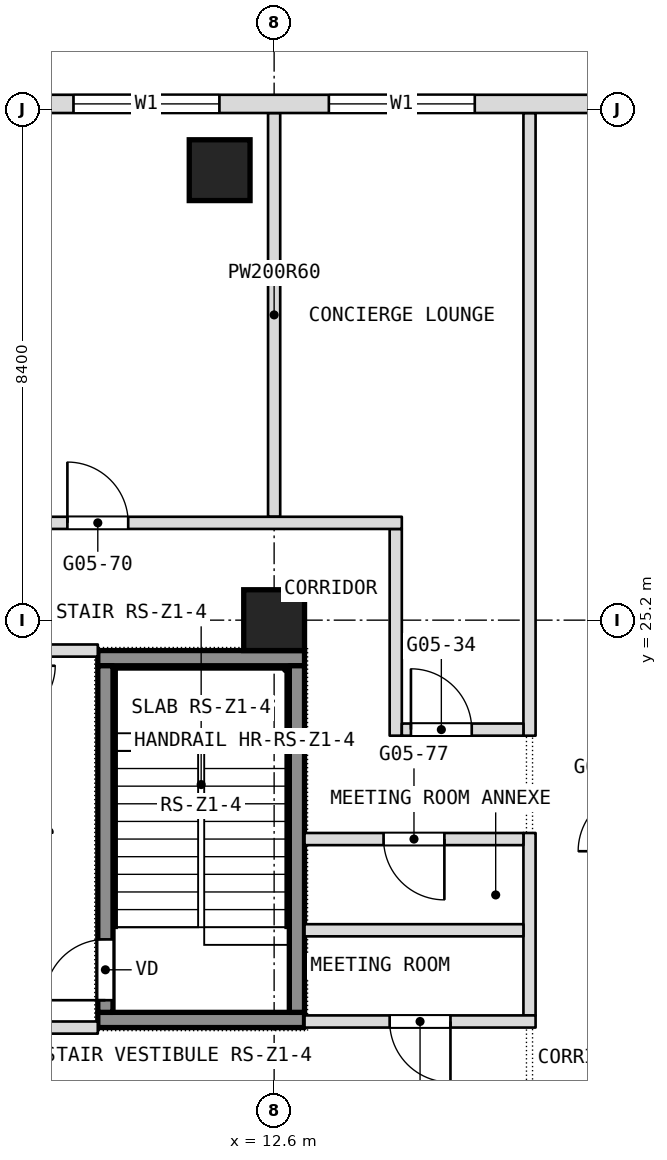
"""IFC4 building model, lengths in metres.
Left out: names, types, materials, properties, quantities, classifications, styles, units other than length and angle.
Written with IfcOpenShell. Run it as: python <this file> out.ifc"""

import sys

from ifc_helpers import new_model, si_unit, direction, frame, frame_2d, origin, origin_2d, place, context, subcontext, project, spatial, rectangle, extrude, element, fill, save


model = new_model("IFC4")
c1 = context("Model", 3, precision=1e-05, world=origin(), true_north=direction((0.0, 1.0)))
c2 = subcontext(c1, "Body", "Model", "MODEL_VIEW")
j1 = project(units=[si_unit("LENGTHUNIT", "METRE"), si_unit("PLANEANGLEUNIT", "RADIAN")], contexts=[c1])
p1 = place(None, origin())
s1 = spatial("IfcSite", under=j1, at=p1, CompositionType="ELEMENT")
p2 = place(p1, origin())
s2 = spatial("IfcBuilding", under=s1, at=p2, CompositionType="ELEMENT")
p3 = place(p2, frame((0.0, 0.0, 65.3)))
s3 = spatial("IfcBuildingStorey", under=s2, at=p3, CompositionType="ELEMENT", Elevation=65.3)
for number, where, z_axis, x_axis in (
    (1, (12.6, 25.2, 0.0), (0.0, 0.0, 1.0), (1.0, 0.0, 0.0)),
    (2, (11.704, 32.6, 0.0), (0.0, 0.0, 1.0), (1.0, 0.0, 0.0)),
):
    element("IfcColumn", number, at=place(p3, frame(where, z_axis=z_axis, x_axis=x_axis)), inside=s3, PredefinedType="COLUMN", context=c2, shape_type="SweptSolid", body=[
        extrude(rectangle(XDim=1.0, YDim=1.0, at=origin_2d()), origin(), (0.0, 0.0, 1.0), 3.6),
    ])
p4 = place(p3, frame((16.8, 18.7, 0.0), z_axis=(0.0, 0.0, 1.0), x_axis=(0.0, 1.0, 0.0)))
e3 = element("IfcWall", 3, at=p4, inside=s3, PredefinedType="PARTITIONING", context=c2, shape_type="SweptSolid", body=[
    extrude(rectangle(XDim=3.0, YDim=0.2, at=frame_2d((1.5, 0.0))), origin(), (0.0, 0.0, 1.0), 3.34),
])
p5 = place(p3, frame((16.8, 23.3, 0.0), z_axis=(0.0, 0.0, 1.0), x_axis=(0.0, 1.0, 0.0)))
e4 = element("IfcWall", 4, at=p5, inside=s3, PredefinedType="PARTITIONING", context=c2, shape_type="SweptSolid", body=[
    extrude(rectangle(XDim=10.24, YDim=0.2, at=frame_2d((5.12, 0.0))), origin(), (0.0, 0.0, 1.0), 3.34),
])
p6 = place(p3, frame((14.6, 23.3, 0.0), z_axis=(0.0, 0.0, 1.0), x_axis=(0.0, 1.0, 0.0)))
e5 = element("IfcWall", 5, at=p6, inside=s3, PredefinedType="PARTITIONING", context=c2, shape_type="SweptSolid", body=[
    extrude(rectangle(XDim=3.4, YDim=0.2, at=frame_2d((1.7, 0.0))), origin(), (0.0, 0.0, 1.0), 3.34),
])
p7 = place(p3, frame((12.6, 26.9, 0.0), z_axis=(0.0, 0.0, 1.0), x_axis=(0.0, 1.0, 0.0)))
e6 = element("IfcWall", 6, at=p7, inside=s3, PredefinedType="PARTITIONING", context=c2, shape_type="SweptSolid", body=[
    extrude(rectangle(XDim=6.64, YDim=0.2, at=frame_2d((3.32, 0.0))), origin(), (0.0, 0.0, 1.0), 3.34),
])
p8 = place(p3, frame((8.1, 18.5, 0.0), z_axis=(0.0, 0.0, 1.0), x_axis=(1.0, 0.0, 0.0)))
e7 = element("IfcWall", 7, at=p8, inside=s3, PredefinedType="PARTITIONING", context=c2, shape_type="SweptSolid", body=[
    extrude(rectangle(XDim=1.6, YDim=0.2, at=frame_2d((0.8, 0.0))), origin(), (0.0, 0.0, 1.0), 3.34),
])
p9 = place(p3, frame((13.1, 18.6, 0.0), z_axis=(0.0, 0.0, 1.0), x_axis=(1.0, 0.0, 0.0)))
e8 = element("IfcWall", 8, at=p9, inside=s3, PredefinedType="PARTITIONING", context=c2, shape_type="SweptSolid", body=[
    extrude(rectangle(XDim=3.8, YDim=0.2, at=frame_2d((1.9, 0.0))), origin(), (0.0, 0.0, 1.0), 3.34),
])
p10 = place(p9, frame((1.4, 0.0, 0.0)))
e9 = element("IfcOpeningElement", 9, at=p10, cuts=e8, PredefinedType="OPENING", context=c2, shape_type="SweptSolid", body=[
    extrude(rectangle(XDim=1.0, YDim=2.1, at=frame_2d((0.5, 1.05))), frame((0.0, 0.1, 0.0), z_axis=(0.0, -1.0, 0.0), x_axis=(1.0, 0.0, 0.0)), (0.0, 0.0, 1.0), 0.2),
])
p11 = place(p3, frame((13.1, 20.1, 0.0), z_axis=(0.0, 0.0, 1.0), x_axis=(1.0, 0.0, 0.0)))
e10 = element("IfcWall", 10, at=p11, inside=s3, PredefinedType="PARTITIONING", context=c2, shape_type="SweptSolid", body=[
    extrude(rectangle(XDim=3.6, YDim=0.2, at=frame_2d((1.8, 0.0))), origin(), (0.0, 0.0, 1.0), 3.34),
])
p12 = place(p3, frame((13.1, 21.6, 0.0), z_axis=(0.0, 0.0, 1.0), x_axis=(1.0, 0.0, 0.0)))
e11 = element("IfcWall", 11, at=p12, inside=s3, PredefinedType="PARTITIONING", context=c2, shape_type="SweptSolid", body=[
    extrude(rectangle(XDim=3.6, YDim=0.2, at=frame_2d((1.8, 0.0))), origin(), (0.0, 0.0, 1.0), 3.34),
])
p13 = place(p12, frame((1.3, 0.0, 0.0)))
e12 = element("IfcOpeningElement", 12, at=p13, cuts=e11, PredefinedType="OPENING", context=c2, shape_type="SweptSolid", body=[
    extrude(rectangle(XDim=1.0, YDim=2.1, at=frame_2d((0.5, 1.05))), frame((0.0, 0.1, 0.0), z_axis=(0.0, -1.0, 0.0), x_axis=(1.0, 0.0, 0.0)), (0.0, 0.0, 1.0), 0.2),
])
p14 = place(p3, frame((14.7, 23.4, 0.0), z_axis=(0.0, 0.0, 1.0), x_axis=(1.0, 0.0, 0.0)))
e13 = element("IfcWall", 13, at=p14, inside=s3, PredefinedType="PARTITIONING", context=c2, shape_type="SweptSolid", body=[
    extrude(rectangle(XDim=2.0, YDim=0.2, at=frame_2d((1.0, 0.0))), origin(), (0.0, 0.0, 1.0), 3.34),
])
p15 = place(p14, frame((0.15, 0.0, 0.0)))
e14 = element("IfcOpeningElement", 14, at=p15, cuts=e13, PredefinedType="OPENING", context=c2, shape_type="SweptSolid", body=[
    extrude(rectangle(XDim=1.0, YDim=2.1, at=frame_2d((0.5, 1.05))), frame((0.0, 0.1, 0.0), z_axis=(0.0, -1.0, 0.0), x_axis=(1.0, 0.0, 0.0)), (0.0, 0.0, 1.0), 0.2),
])
p16 = place(p3, frame((8.0, 24.7, 0.0), z_axis=(0.0, 0.0, 1.0), x_axis=(1.0, 0.0, 0.0)))
e15 = element("IfcWall", 15, at=p16, inside=s3, PredefinedType="PARTITIONING", context=c2, shape_type="SweptSolid", body=[
    extrude(rectangle(XDim=1.7, YDim=0.2, at=frame_2d((0.85, 0.0))), origin(), (0.0, 0.0, 1.0), 3.34),
])
p17 = place(p3, frame((6.7, 26.8, 0.0), z_axis=(0.0, 0.0, 1.0), x_axis=(1.0, 0.0, 0.0)))
e16 = element("IfcWall", 16, at=p17, inside=s3, PredefinedType="PARTITIONING", context=c2, shape_type="SweptSolid", body=[
    extrude(rectangle(XDim=8.0, YDim=0.2, at=frame_2d((4.0, 0.0))), origin(), (0.0, 0.0, 1.0), 3.34),
])
p18 = place(p17, frame((2.5, 0.0, 0.0)))
e17 = element("IfcOpeningElement", 17, at=p18, cuts=e16, PredefinedType="OPENING", context=c2, shape_type="SweptSolid", body=[
    extrude(rectangle(XDim=1.0, YDim=2.1, at=frame_2d((0.5, 1.05))), frame((0.0, 0.1, 0.0), z_axis=(0.0, -1.0, 0.0), x_axis=(1.0, 0.0, 0.0)), (0.0, 0.0, 1.0), 0.2),
])
p19 = place(p3, frame((23.406, 33.69, 0.0), z_axis=(0.0, 0.0, 1.0), x_axis=(-1.0, 0.0, 0.0)))
e18 = element("IfcWall", 18, at=p19, inside=s3, PredefinedType="NOTDEFINED", context=c2, shape_type="SweptSolid", body=[
    extrude(rectangle(XDim=46.812, YDim=0.3, at=frame_2d((23.406, 0.0))), origin(), (0.0, 0.0, 1.0), 3.6),
])
p20 = place(p19, frame((2.186, 0.0, 0.9)))
e19 = element("IfcOpeningElement", 19, at=p20, cuts=e18, PredefinedType="OPENING", context=c2, shape_type="SweptSolid", body=[
    extrude(rectangle(XDim=2.4, YDim=2.1, at=frame_2d((1.2, 1.05))), frame((0.0, 0.15, 0.0), z_axis=(0.0, -1.0, 0.0), x_axis=(1.0, 0.0, 0.0)), (0.0, 0.0, 1.0), 0.3),
])
p21 = place(p19, frame((7.506, 0.0, 0.9)))
e20 = element("IfcOpeningElement", 20, at=p21, cuts=e18, PredefinedType="OPENING", context=c2, shape_type="SweptSolid", body=[
    extrude(rectangle(XDim=2.4, YDim=2.1, at=frame_2d((1.2, 1.05))), frame((0.0, 0.15, 0.0), z_axis=(0.0, -1.0, 0.0), x_axis=(1.0, 0.0, 0.0)), (0.0, 0.0, 1.0), 0.3),
])
p22 = place(p19, frame((11.706, 0.0, 0.9)))
e21 = element("IfcOpeningElement", 21, at=p22, cuts=e18, PredefinedType="OPENING", context=c2, shape_type="SweptSolid", body=[
    extrude(rectangle(XDim=2.4, YDim=2.1, at=frame_2d((1.2, 1.05))), frame((0.0, 0.15, 0.0), z_axis=(0.0, -1.0, 0.0), x_axis=(1.0, 0.0, 0.0)), (0.0, 0.0, 1.0), 0.3),
])
p23 = place(p19, frame((15.906, 0.0, 0.9)))
e22 = element("IfcOpeningElement", 22, at=p23, cuts=e18, PredefinedType="OPENING", context=c2, shape_type="SweptSolid", body=[
    extrude(rectangle(XDim=2.4, YDim=2.1, at=frame_2d((1.2, 1.05))), frame((0.0, 0.15, 0.0), z_axis=(0.0, -1.0, 0.0), x_axis=(1.0, 0.0, 0.0)), (0.0, 0.0, 1.0), 0.3),
])
p24 = place(p19, frame((20.106, 0.0, 0.9)))
e23 = element("IfcOpeningElement", 23, at=p24, cuts=e18, PredefinedType="OPENING", context=c2, shape_type="SweptSolid", body=[
    extrude(rectangle(XDim=2.4, YDim=2.1, at=frame_2d((1.2, 1.05))), frame((0.0, 0.15, 0.0), z_axis=(0.0, -1.0, 0.0), x_axis=(1.0, 0.0, 0.0)), (0.0, 0.0, 1.0), 0.3),
])
p25 = place(p19, frame((24.306, 0.0, 0.9)))
e24 = element("IfcOpeningElement", 24, at=p25, cuts=e18, PredefinedType="OPENING", context=c2, shape_type="SweptSolid", body=[
    extrude(rectangle(XDim=2.4, YDim=2.1, at=frame_2d((1.2, 1.05))), frame((0.0, 0.15, 0.0), z_axis=(0.0, -1.0, 0.0), x_axis=(1.0, 0.0, 0.0)), (0.0, 0.0, 1.0), 0.3),
])
p26 = place(p19, frame((28.506, 0.0, 0.9)))
e25 = element("IfcOpeningElement", 25, at=p26, cuts=e18, PredefinedType="OPENING", context=c2, shape_type="SweptSolid", body=[
    extrude(rectangle(XDim=2.4, YDim=2.1, at=frame_2d((1.2, 1.05))), frame((0.0, 0.15, 0.0), z_axis=(0.0, -1.0, 0.0), x_axis=(1.0, 0.0, 0.0)), (0.0, 0.0, 1.0), 0.3),
])
p27 = place(p19, frame((32.706, 0.0, 0.9)))
e26 = element("IfcOpeningElement", 26, at=p27, cuts=e18, PredefinedType="OPENING", context=c2, shape_type="SweptSolid", body=[
    extrude(rectangle(XDim=2.4, YDim=2.1, at=frame_2d((1.2, 1.05))), frame((0.0, 0.15, 0.0), z_axis=(0.0, -1.0, 0.0), x_axis=(1.0, 0.0, 0.0)), (0.0, 0.0, 1.0), 0.3),
])
p28 = place(p19, frame((36.906, 0.0, 0.9)))
e27 = element("IfcOpeningElement", 27, at=p28, cuts=e18, PredefinedType="OPENING", context=c2, shape_type="SweptSolid", body=[
    extrude(rectangle(XDim=2.4, YDim=2.1, at=frame_2d((1.2, 1.05))), frame((0.0, 0.15, 0.0), z_axis=(0.0, -1.0, 0.0), x_axis=(1.0, 0.0, 0.0)), (0.0, 0.0, 1.0), 0.3),
])
p29 = place(p19, frame((42.226, 0.0, 0.9)))
e28 = element("IfcOpeningElement", 28, at=p29, cuts=e18, PredefinedType="OPENING", context=c2, shape_type="SweptSolid", body=[
    extrude(rectangle(XDim=2.4, YDim=2.1, at=frame_2d((1.2, 1.05))), frame((0.0, 0.15, 0.0), z_axis=(0.0, -1.0, 0.0), x_axis=(1.0, 0.0, 0.0)), (0.0, 0.0, 1.0), 0.3),
])
for number, where, z_axis, x_axis in (
    (29, (9.7, 18.625, 0.1), (0.0, 0.0, 1.0), (1.0, 0.0, 0.0)),
    (30, (9.7, 24.575, 0.1), (0.0, 0.0, 1.0), (1.0, 0.0, 0.0)),
):
    element("IfcWall", number, at=place(p3, frame(where, z_axis=z_axis, x_axis=x_axis)), inside=s3, PredefinedType="SHEAR", context=c2, shape_type="SweptSolid", body=[
        extrude(rectangle(XDim=3.4, YDim=0.25, at=frame_2d((1.7, 0.0))), origin(), (0.0, 0.0, 1.0), 3.6),
    ])
p30 = place(p3, frame((9.825, 18.75, 0.1), z_axis=(0.0, 0.0, 1.0), x_axis=(0.0, 1.0, 0.0)))
e31 = element("IfcWall", 31, at=p30, inside=s3, PredefinedType="SHEAR", context=c2, shape_type="SweptSolid", body=[
    extrude(rectangle(XDim=5.7, YDim=0.25, at=frame_2d((2.85, 0.0))), origin(), (0.0, 0.0, 1.0), 3.6),
])
p31 = place(p30, frame((0.2, 0.0, 0.0)))
e32 = element("IfcOpeningElement", 32, at=p31, cuts=e31, PredefinedType="OPENING", context=c2, shape_type="SweptSolid", body=[
    extrude(rectangle(XDim=1.0, YDim=2.1, at=frame_2d((0.5, 1.05))), frame((0.0, 0.125, 0.0), z_axis=(0.0, -1.0, 0.0), x_axis=(1.0, 0.0, 0.0)), (0.0, 0.0, 1.0), 0.25),
])
p32 = place(p3, frame((12.975, 18.75, 0.1), z_axis=(0.0, 0.0, 1.0), x_axis=(0.0, 1.0, 0.0)))
e33 = element("IfcWall", 33, at=p32, inside=s3, PredefinedType="SHEAR", context=c2, shape_type="SweptSolid", body=[
    extrude(rectangle(XDim=5.7, YDim=0.25, at=frame_2d((2.85, 0.0))), origin(), (0.0, 0.0, 1.0), 3.6),
])
p33 = place(p10, origin())
e34 = element("IfcDoor", 34, at=p33, inside=s3, OperationType="SINGLE_SWING_LEFT", PredefinedType="DOOR", context=c2, shape_type="SweptSolid", body=[
    extrude(rectangle(XDim=1.0, YDim=2.1, at=frame_2d((0.5, 1.05))), frame((0.0, 0.025, 0.0), z_axis=(0.0, -1.0, 0.0), x_axis=(1.0, 0.0, 0.0)), (0.0, 0.0, 1.0), 0.05),
])
fill(e9, e34)
p34 = place(p13, origin())
e35 = element("IfcDoor", 35, at=p34, inside=s3, OperationType="SINGLE_SWING_RIGHT", PredefinedType="DOOR", context=c2, shape_type="SweptSolid", body=[
    extrude(rectangle(XDim=1.0, YDim=2.1, at=frame_2d((0.5, 1.05))), frame((0.0, 0.025, 0.0), z_axis=(0.0, -1.0, 0.0), x_axis=(1.0, 0.0, 0.0)), (0.0, 0.0, 1.0), 0.05),
])
fill(e12, e35)
p35 = place(p15, origin())
e36 = element("IfcDoor", 36, at=p35, inside=s3, OperationType="SINGLE_SWING_LEFT", PredefinedType="DOOR", context=c2, shape_type="SweptSolid", body=[
    extrude(rectangle(XDim=1.0, YDim=2.1, at=frame_2d((0.5, 1.05))), frame((0.0, 0.025, 0.0), z_axis=(0.0, -1.0, 0.0), x_axis=(1.0, 0.0, 0.0)), (0.0, 0.0, 1.0), 0.05),
])
fill(e14, e36)
p36 = place(p18, origin())
e37 = element("IfcDoor", 37, at=p36, inside=s3, OperationType="SINGLE_SWING_RIGHT", PredefinedType="DOOR", context=c2, shape_type="SweptSolid", body=[
    extrude(rectangle(XDim=1.0, YDim=2.1, at=frame_2d((0.5, 1.05))), frame((0.0, 0.025, 0.0), z_axis=(0.0, -1.0, 0.0), x_axis=(1.0, 0.0, 0.0)), (0.0, 0.0, 1.0), 0.05),
])
fill(e17, e37)
p37 = place(p21, origin())
e38 = element("IfcWindow", 38, at=p37, inside=s3, PartitioningType="SINGLE_PANEL", PredefinedType="WINDOW", context=c2, shape_type="SweptSolid", body=[
    extrude(rectangle(XDim=2.4, YDim=2.1, at=frame_2d((1.2, 1.05))), frame((0.0, 0.03, 0.0), z_axis=(0.0, -1.0, 0.0), x_axis=(1.0, 0.0, 0.0)), (0.0, 0.0, 1.0), 0.06),
])
fill(e20, e38)
p38 = place(p22, origin())
e39 = element("IfcWindow", 39, at=p38, inside=s3, PartitioningType="SINGLE_PANEL", PredefinedType="WINDOW", context=c2, shape_type="SweptSolid", body=[
    extrude(rectangle(XDim=2.4, YDim=2.1, at=frame_2d((1.2, 1.05))), frame((0.0, 0.03, 0.0), z_axis=(0.0, -1.0, 0.0), x_axis=(1.0, 0.0, 0.0)), (0.0, 0.0, 1.0), 0.06),
])
fill(e21, e39)
p39 = place(p31, origin())
e40 = element("IfcDoor", 40, at=p39, inside=s3, OperationType="SINGLE_SWING_LEFT", PredefinedType="DOOR", context=c2, shape_type="SweptSolid", body=[
    extrude(rectangle(XDim=1.0, YDim=2.1, at=frame_2d((0.5, 1.05))), frame((0.0, 0.025, 0.0), z_axis=(0.0, -1.0, 0.0), x_axis=(1.0, 0.0, 0.0)), (0.0, 0.0, 1.0), 0.05),
])
fill(e32, e40)
save(model, sys.argv[1])
